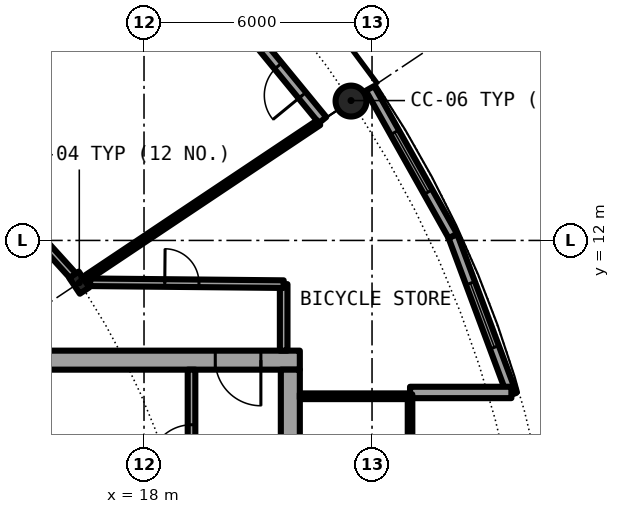
"""IFC4 building model, lengths in metres.
Left out: names, types, materials, properties, quantities, classifications, styles, units other than length and angle.
Written with IfcOpenShell. Run it as: python <this file> out.ifc"""

import sys

from ifc_helpers import new_model, si_unit, direction, frame, frame_2d, origin, origin_2d, place, context, subcontext, project, spatial, rectangle, hollow_circle, i_section, extrude, element, fill, save


model = new_model("IFC4")
c1 = context("Model", 3, precision=1e-05, world=origin(), true_north=direction((0.0, 1.0)))
c2 = subcontext(c1, "Body", "Model", "MODEL_VIEW")
j1 = project(units=[si_unit("LENGTHUNIT", "METRE"), si_unit("PLANEANGLEUNIT", "RADIAN")], contexts=[c1])
p1 = place(None, origin())
s1 = spatial("IfcSite", under=j1, at=p1, CompositionType="ELEMENT")
p2 = place(p1, origin())
s2 = spatial("IfcBuilding", under=s1, at=p2, CompositionType="ELEMENT")
p3 = place(p2, frame((0.0, 0.0, 157.4)))
s3 = spatial("IfcBuildingStorey", under=s2, at=p3, CompositionType="ELEMENT", Elevation=157.4)
p4 = place(p3, frame((23.448, 15.667, 0.0), z_axis=(0.0, 0.0, 1.0), x_axis=(1.0, 0.0, 0.0)))
e1 = element("IfcColumn", 1, at=p4, inside=s3, PredefinedType="COLUMN", context=c2, shape_type="SweptSolid", body=[
    extrude(hollow_circle(Radius=0.406, WallThickness=0.04, at=origin_2d()), origin(), (0.0, 0.0, 1.0), 4.2),
])
p5 = place(p3, frame((16.297, 10.889, 0.0), z_axis=(0.0, 0.0, 1.0), x_axis=(0.831469612303, 0.55557023302, 0.0)))
e2 = element("IfcColumn", 2, at=p5, inside=s3, PredefinedType="COLUMN", context=c2, shape_type="SweptSolid", body=[
    extrude(i_section(OverallWidth=0.3, OverallDepth=0.5, WebThickness=0.014, FlangeThickness=0.028, FilletRadius=0.027, at=origin_2d()), origin(), (0.0, 0.0, 1.0), 4.2),
])
p6 = place(p3, frame((22.699, 15.167, 0.0), z_axis=(0.0, 0.0, 1.0), x_axis=(-0.634382322723, 0.773019449054, 0.0)))
e3 = element("IfcWall", 3, at=p6, inside=s3, PredefinedType="SOLIDWALL", context=c2, shape_type="SweptSolid", body=[
    extrude(rectangle(XDim=5.352, YDim=0.25, at=frame_2d((2.676, 0.0))), origin(), (0.0, 0.0, 1.0), 3.85),
])
p7 = place(p6, frame((0.841, 0.0, 0.0)))
e4 = element("IfcOpeningElement", 4, at=p7, cuts=e3, PredefinedType="OPENING", context=c2, shape_type="SweptSolid", body=[
    extrude(rectangle(XDim=1.0, YDim=2.2, at=frame_2d((0.5, 1.1))), frame((0.0, 0.135, 0.0), z_axis=(0.0, -1.0, 0.0), x_axis=(1.0, 0.0, 0.0)), (0.0, 0.0, 1.0), 0.27),
])
p8 = place(p6, frame((3.51, 0.0, 0.0)))
e5 = element("IfcOpeningElement", 5, at=p8, cuts=e3, PredefinedType="OPENING", context=c2, shape_type="SweptSolid", body=[
    extrude(rectangle(XDim=1.0, YDim=2.2, at=frame_2d((0.5, 1.1))), frame((0.0, 0.135, 0.0), z_axis=(0.0, -1.0, 0.0), x_axis=(1.0, 0.0, 0.0)), (0.0, 0.0, 1.0), 0.27),
])
p9 = place(p3, frame((27.682, 7.945, 0.0), z_axis=(0.0, 0.0, 1.0), x_axis=(-0.349247811493, 0.937030397675, 0.0)))
e6 = element("IfcWall", 6, at=p9, inside=s3, PredefinedType="SOLIDWALL", context=c2, shape_type="SweptSolid", body=[
    extrude(rectangle(XDim=4.452, YDim=0.25, at=frame_2d((2.226, 0.0))), origin(), (0.0, 0.0, 1.0), 3.85),
])
p10 = place(p9, frame((1.327, 0.0, 0.3)))
e7 = element("IfcOpeningElement", 7, at=p10, cuts=e6, PredefinedType="OPENING", context=c2, shape_type="SweptSolid", body=[
    extrude(rectangle(XDim=1.8, YDim=2.1, at=frame_2d((0.9, 1.05))), frame((0.0, 0.135, 0.0), z_axis=(0.0, -1.0, 0.0), x_axis=(1.0, 0.0, 0.0)), (0.0, 0.0, 1.0), 0.27),
])
p11 = place(p3, frame((26.127, 12.117, 0.0), z_axis=(0.0, 0.0, 1.0), x_axis=(-0.489696356642, 0.871893042919, 0.0)))
e8 = element("IfcWall", 8, at=p11, inside=s3, PredefinedType="SOLIDWALL", context=c2, shape_type="SweptSolid", body=[
    extrude(rectangle(XDim=4.454, YDim=0.25, at=frame_2d((2.227, 0.0))), origin(), (0.0, 0.0, 1.0), 3.85),
])
p12 = place(p11, frame((1.327, 0.0, 0.3)))
e9 = element("IfcOpeningElement", 9, at=p12, cuts=e8, PredefinedType="OPENING", context=c2, shape_type="SweptSolid", body=[
    extrude(rectangle(XDim=1.8, YDim=2.1, at=frame_2d((0.9, 1.05))), frame((0.0, 0.135, 0.0), z_axis=(0.0, -1.0, 0.0), x_axis=(1.0, 0.0, 0.0)), (0.0, 0.0, 1.0), 0.27),
])
p13 = place(p3, frame((25.0, 8.0, 0.0), z_axis=(0.0, 0.0, 1.0), x_axis=(1.0, 0.0, 0.0)))
e10 = element("IfcWall", 10, at=p13, inside=s3, PredefinedType="SOLIDWALL", context=c2, shape_type="SweptSolid", body=[
    extrude(rectangle(XDim=2.667, YDim=0.3, at=frame_2d((1.333, 0.0))), origin(), (0.0, 0.0, 1.0), 3.85),
])
p14 = place(p3, frame((22.1, 8.85, 0.0), z_axis=(0.0, 0.0, 1.0), x_axis=(-1.0, 0.0, 0.0)))
e11 = element("IfcWall", 11, at=p14, inside=s3, PredefinedType="SHEAR", context=c2, shape_type="SweptSolid", body=[
    extrude(rectangle(XDim=13.6, YDim=0.5, at=frame_2d((6.8, 0.0))), origin(), (0.0, 0.0, 1.0), 4.2),
])
p15 = place(p14, frame((1.025, 0.0, 0.0)))
e12 = element("IfcOpeningElement", 12, at=p15, cuts=e11, PredefinedType="OPENING", context=c2, shape_type="SweptSolid", body=[
    extrude(rectangle(XDim=1.2, YDim=2.3, at=frame_2d((0.6, 1.15))), frame((0.0, 0.26, 0.0), z_axis=(0.0, -1.0, 0.0), x_axis=(1.0, 0.0, 0.0)), (0.0, 0.0, 1.0), 0.52),
])
p16 = place(p3, frame((21.85, 8.6, 0.0), z_axis=(0.0, 0.0, 1.0), x_axis=(0.0, -1.0, 0.0)))
e13 = element("IfcWall", 13, at=p16, inside=s3, PredefinedType="SHEAR", context=c2, shape_type="SweptSolid", body=[
    extrude(rectangle(XDim=17.2, YDim=0.5, at=frame_2d((8.6, 0.0))), origin(), (0.0, 0.0, 1.0), 4.2),
])
p17 = place(p16, frame((7.7, 0.0, 0.0)))
e14 = element("IfcOpeningElement", 14, at=p17, cuts=e13, PredefinedType="OPENING", context=c2, shape_type="SweptSolid", body=[
    extrude(rectangle(XDim=1.8, YDim=2.3, at=frame_2d((0.9, 1.15))), frame((0.0, 0.26, 0.0), z_axis=(0.0, -1.0, 0.0), x_axis=(1.0, 0.0, 0.0)), (0.0, 0.0, 1.0), 0.52),
])
p18 = place(p3, frame((19.25, 1.575, 0.0), z_axis=(0.0, 0.0, 1.0), x_axis=(0.0, 1.0, 0.0)))
e15 = element("IfcWall", 15, at=p18, inside=s3, PredefinedType="SOLIDWALL", context=c2, shape_type="SweptSolid", body=[
    extrude(rectangle(XDim=7.025, YDim=0.2, at=frame_2d((3.513, 0.0))), origin(), (0.0, 0.0, 1.0), 3.85),
])
p19 = place(p18, frame((4.475, 0.0, 0.0)))
e16 = element("IfcOpeningElement", 16, at=p19, cuts=e15, PredefinedType="OPENING", context=c2, shape_type="SweptSolid", body=[
    extrude(rectangle(XDim=1.1, YDim=2.3, at=frame_2d((0.55, 1.15))), frame((0.0, 0.11, 0.0), z_axis=(0.0, -1.0, 0.0), x_axis=(1.0, 0.0, 0.0)), (0.0, 0.0, 1.0), 0.22),
])
p20 = place(p3, frame((22.1, 7.9, 0.0), z_axis=(0.0, 0.0, 1.0), x_axis=(1.0, 0.0, 0.0)))
e17 = element("IfcWall", 17, at=p20, inside=s3, PredefinedType="PARTITIONING", context=c2, shape_type="SweptSolid", body=[
    extrude(rectangle(XDim=2.84, YDim=0.15, at=frame_2d((1.42, 0.0))), origin(), (0.0, 0.0, 1.0), 3.85),
])
p21 = place(p3, frame((25.0, -7.95, 0.0), z_axis=(0.0, 0.0, 1.0), x_axis=(0.0, 1.0, 0.0)))
e18 = element("IfcWall", 18, at=p21, inside=s3, PredefinedType="PARTITIONING", context=c2, shape_type="SweptSolid", body=[
    extrude(rectangle(XDim=15.9, YDim=0.12, at=frame_2d((7.95, 0.0))), origin(), (0.0, 0.0, 1.0), 3.85),
])
p22 = place(p21, frame((0.95, 0.0, 0.1)))
e19 = element("IfcOpeningElement", 19, at=p22, cuts=e18, PredefinedType="OPENING", context=c2, shape_type="SweptSolid", body=[
    extrude(rectangle(XDim=14.0, YDim=3.5, at=frame_2d((7.0, 1.75))), frame((0.0, 0.07, 0.0), z_axis=(0.0, -1.0, 0.0), x_axis=(1.0, 0.0, 0.0)), (0.0, 0.0, 1.0), 0.14),
])
p23 = place(p3, frame((21.675, 9.1, 0.0), z_axis=(0.0, 0.0, 1.0), x_axis=(0.0, 1.0, 0.0)))
e20 = element("IfcWall", 20, at=p23, inside=s3, PredefinedType="PARTITIONING", context=c2, shape_type="SweptSolid", body=[
    extrude(rectangle(XDim=1.75, YDim=0.2, at=frame_2d((0.875, 0.0))), origin(), (0.0, 0.0, 1.0), 3.85),
])
p24 = place(p3, frame((16.505, 11.028, 0.0), z_axis=(0.0, 0.0, 1.0), x_axis=(0.831434446288, 0.555622859075, 0.0)))
e21 = element("IfcWall", 21, at=p24, inside=s3, PredefinedType="PARTITIONING", context=c2, shape_type="SweptSolid", body=[
    extrude(rectangle(XDim=7.325, YDim=0.15, at=frame_2d((3.662, 0.0))), origin(), (0.0, 0.0, 1.0), 3.85),
])
p25 = place(p3, frame((16.582, 10.899, 0.0), z_axis=(0.0, 0.0, 1.0), x_axis=(0.999954045313, -0.009586827528, 0.0)))
e22 = element("IfcWall", 22, at=p25, inside=s3, PredefinedType="PARTITIONING", context=c2, shape_type="SweptSolid", body=[
    extrude(rectangle(XDim=5.093, YDim=0.2, at=frame_2d((2.547, 0.0))), origin(), (0.0, 0.0, 1.0), 3.85),
])
p26 = place(p25, frame((1.964, 0.0, 0.0)))
e23 = element("IfcOpeningElement", 23, at=p26, cuts=e22, PredefinedType="OPENING", context=c2, shape_type="SweptSolid", body=[
    extrude(rectangle(XDim=0.9, YDim=2.3, at=frame_2d((0.45, 1.15))), frame((0.0, 0.11, 0.0), z_axis=(0.0, -1.0, 0.0), x_axis=(1.0, 0.0, 0.0)), (0.0, 0.0, 1.0), 0.22),
])
p27 = place(p3, frame((12.434, 15.151, 0.0), z_axis=(0.0, 0.0, 1.0), x_axis=(0.671532887857, -0.740974750262, 0.0)))
e24 = element("IfcWall", 24, at=p27, inside=s3, PredefinedType="PARTITIONING", context=c2, shape_type="SweptSolid", body=[
    extrude(rectangle(XDim=5.601, YDim=0.2, at=frame_2d((2.8, 0.0))), origin(), (0.0, 0.0, 1.0), 3.54),
])
p28 = place(p7, origin())
e25 = element("IfcDoor", 25, at=p28, inside=s3, OperationType="SINGLE_SWING_LEFT", PredefinedType="DOOR", context=c2, shape_type="SweptSolid", body=[
    extrude(rectangle(XDim=1.0, YDim=2.2, at=frame_2d((0.5, 1.1))), frame((0.0, 0.025, 0.0), z_axis=(0.0, -1.0, 0.0), x_axis=(1.0, 0.0, 0.0)), (0.0, 0.0, 1.0), 0.05),
])
fill(e4, e25)
p29 = place(p10, origin())
e26 = element("IfcWindow", 26, at=p29, inside=s3, PartitioningType="SINGLE_PANEL", PredefinedType="WINDOW", context=c2, shape_type="SweptSolid", body=[
    extrude(rectangle(XDim=1.8, YDim=2.1, at=frame_2d((0.9, 1.05))), frame((0.0, 0.03, 0.0), z_axis=(0.0, -1.0, 0.0), x_axis=(1.0, 0.0, 0.0)), (0.0, 0.0, 1.0), 0.06),
])
fill(e7, e26)
p30 = place(p12, origin())
e27 = element("IfcWindow", 27, at=p30, inside=s3, PartitioningType="SINGLE_PANEL", PredefinedType="WINDOW", context=c2, shape_type="SweptSolid", body=[
    extrude(rectangle(XDim=1.8, YDim=2.1, at=frame_2d((0.9, 1.05))), frame((0.0, 0.03, 0.0), z_axis=(0.0, -1.0, 0.0), x_axis=(1.0, 0.0, 0.0)), (0.0, 0.0, 1.0), 0.06),
])
fill(e9, e27)
p31 = place(p19, origin())
e28 = element("IfcDoor", 28, at=p31, inside=s3, OperationType="SINGLE_SWING_LEFT", PredefinedType="DOOR", context=c2, shape_type="SweptSolid", body=[
    extrude(rectangle(XDim=1.1, YDim=2.3, at=frame_2d((0.55, 1.15))), frame((0.0, 0.025, 0.0), z_axis=(0.0, -1.0, 0.0), x_axis=(1.0, 0.0, 0.0)), (0.0, 0.0, 1.0), 0.05),
])
fill(e16, e28)
p32 = place(p15, origin())
e29 = element("IfcDoor", 29, at=p32, inside=s3, OperationType="SINGLE_SWING_RIGHT", PredefinedType="DOOR", context=c2, shape_type="SweptSolid", body=[
    extrude(rectangle(XDim=1.2, YDim=2.3, at=frame_2d((0.6, 1.15))), frame((0.0, 0.025, 0.0), z_axis=(0.0, -1.0, 0.0), x_axis=(1.0, 0.0, 0.0)), (0.0, 0.0, 1.0), 0.05),
])
fill(e12, e29)
p33 = place(p22, origin())
e30 = element("IfcWindow", 30, at=p33, inside=s3, PartitioningType="SINGLE_PANEL", PredefinedType="WINDOW", context=c2, shape_type="SweptSolid", body=[
    extrude(rectangle(XDim=14.0, YDim=3.5, at=frame_2d((7.0, 1.75))), frame((0.0, 0.03, 0.0), z_axis=(0.0, -1.0, 0.0), x_axis=(1.0, 0.0, 0.0)), (0.0, 0.0, 1.0), 0.06),
])
fill(e19, e30)
p34 = place(p26, origin())
e31 = element("IfcDoor", 31, at=p34, inside=s3, OperationType="SINGLE_SWING_LEFT", PredefinedType="DOOR", context=c2, shape_type="SweptSolid", body=[
    extrude(rectangle(XDim=0.9, YDim=2.3, at=frame_2d((0.45, 1.15))), frame((0.0, 0.025, 0.0), z_axis=(0.0, -1.0, 0.0), x_axis=(1.0, 0.0, 0.0)), (0.0, 0.0, 1.0), 0.05),
])
fill(e23, e31)
save(model, sys.argv[1])
